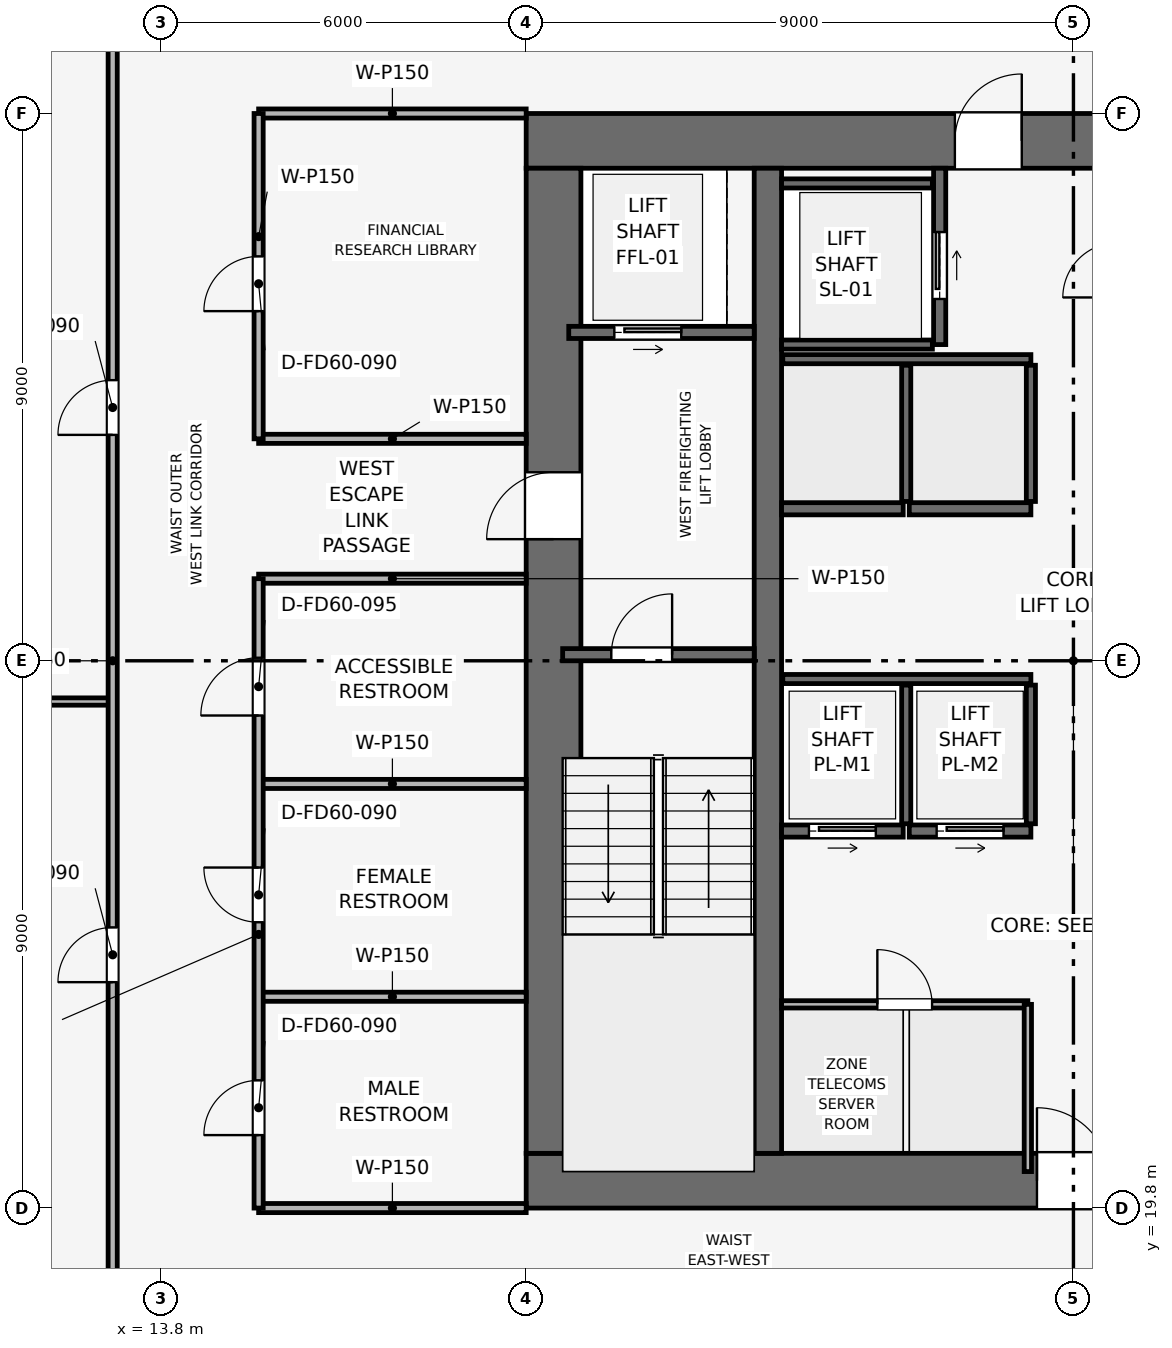
"""IFC4 building model, lengths in metres.
Left out: names, types, materials, properties, quantities, classifications, styles, units other than length and angle.
Written with IfcOpenShell. Run it as: python <this file> out.ifc"""

import sys

from ifc_helpers import new_model, si_unit, direction, frame, frame_2d, origin, place, context, subcontext, project, spatial, rectangle, extrude, element, fill, save


model = new_model("IFC4")
c1 = context("Model", 3, precision=1e-05, world=origin(), true_north=direction((0.0, 1.0)))
c2 = subcontext(c1, "Body", "Model", "MODEL_VIEW")
j1 = project(units=[si_unit("LENGTHUNIT", "METRE"), si_unit("PLANEANGLEUNIT", "RADIAN")], contexts=[c1])
p1 = place(None, origin())
s1 = spatial("IfcSite", under=j1, at=p1, CompositionType="ELEMENT")
p2 = place(p1, origin())
s2 = spatial("IfcBuilding", under=s1, at=p2, CompositionType="ELEMENT")
p3 = place(p2, frame((0.0, 0.0, 145.8)))
s3 = spatial("IfcBuildingStorey", under=s2, at=p3, CompositionType="ELEMENT", Elevation=145.8)
p4 = place(p3, frame((19.8, 20.25, 0.0), z_axis=(0.0, 0.0, 1.0), x_axis=(1.0, 0.0, 0.0)))
e1 = element("IfcWall", 1, at=p4, inside=s3, PredefinedType="SHEAR", context=c2, shape_type="SweptSolid", body=[
    extrude(rectangle(XDim=18.0, YDim=0.9, at=frame_2d((9.0, 0.0))), origin(), (0.0, 0.0, 1.0), 3.75),
])
p5 = place(p4, frame((8.4, 0.0, 0.0)))
e2 = element("IfcOpeningElement", 2, at=p5, cuts=e1, PredefinedType="OPENING", context=c2, shape_type="SweptSolid", body=[
    extrude(rectangle(XDim=1.2, YDim=2.2, at=frame_2d((0.6, 1.1))), frame((0.0, 0.46, 0.0), z_axis=(0.0, -1.0, 0.0), x_axis=(1.0, 0.0, 0.0)), (0.0, 0.0, 1.0), 0.92),
])
p6 = place(p3, frame((19.8, 37.35, 0.0), z_axis=(0.0, 0.0, 1.0), x_axis=(1.0, 0.0, 0.0)))
e3 = element("IfcWall", 3, at=p6, inside=s3, PredefinedType="SHEAR", context=c2, shape_type="SweptSolid", body=[
    extrude(rectangle(XDim=18.0, YDim=0.9, at=frame_2d((9.0, 0.0))), origin(), (0.0, 0.0, 1.0), 3.75),
])
p7 = place(p6, frame((7.05, 0.0, 0.0)))
e4 = element("IfcOpeningElement", 4, at=p7, cuts=e3, PredefinedType="OPENING", context=c2, shape_type="SweptSolid", body=[
    extrude(rectangle(XDim=1.1, YDim=2.15, at=frame_2d((0.55, 1.075))), frame((0.0, 0.46, 0.0), z_axis=(0.0, -1.0, 0.0), x_axis=(1.0, 0.0, 0.0)), (0.0, 0.0, 1.0), 0.92),
])
p8 = place(p3, frame((20.25, 20.7, 0.0), z_axis=(0.0, 0.0, 1.0), x_axis=(0.0, 1.0, 0.0)))
e5 = element("IfcWall", 5, at=p8, inside=s3, PredefinedType="SHEAR", context=c2, shape_type="SweptSolid", body=[
    extrude(rectangle(XDim=16.2, YDim=0.9, at=frame_2d((8.1, 0.0))), origin(), (0.0, 0.0, 1.0), 3.75),
])
p9 = place(p8, frame((10.1, 0.0, 0.0)))
e6 = element("IfcOpeningElement", 6, at=p9, cuts=e5, PredefinedType="OPENING", context=c2, shape_type="SweptSolid", body=[
    extrude(rectangle(XDim=1.1, YDim=2.15, at=frame_2d((0.55, 1.075))), frame((0.0, 0.46, 0.0), z_axis=(0.0, -1.0, 0.0), x_axis=(1.0, 0.0, 0.0)), (0.0, 0.0, 1.0), 0.92),
])
p10 = place(p3, frame((23.775, 20.7, 0.0), z_axis=(0.0, 0.0, 1.0), x_axis=(0.0, 1.0, 0.0)))
e7 = element("IfcWall", 7, at=p10, inside=s3, PredefinedType="SHEAR", context=c2, shape_type="SweptSolid", body=[
    extrude(rectangle(XDim=16.2, YDim=0.45, at=frame_2d((8.1, 0.0))), origin(), (0.0, 0.0, 1.0), 3.75),
])
p11 = place(p3, frame((20.4, 28.9, 0.0), z_axis=(0.0, 0.0, 1.0), x_axis=(1.0, 0.0, 0.0)))
e8 = element("IfcWall", 8, at=p11, inside=s3, PredefinedType="SHEAR", context=c2, shape_type="SweptSolid", body=[
    extrude(rectangle(XDim=3.15, YDim=0.2, at=frame_2d((1.575, 0.0))), origin(), (0.0, 0.0, 1.0), 3.495),
])
p12 = place(p11, frame((0.8, 0.0, 0.0)))
e9 = element("IfcOpeningElement", 9, at=p12, cuts=e8, PredefinedType="OPENING", context=c2, shape_type="SweptSolid", body=[
    extrude(rectangle(XDim=1.0, YDim=2.1, at=frame_2d((0.5, 1.05))), frame((0.0, 0.11, 0.0), z_axis=(0.0, -1.0, 0.0), x_axis=(1.0, 0.0, 0.0)), (0.0, 0.0, 1.0), 0.22),
])
p13 = place(p3, frame((20.5, 34.2, 0.0), z_axis=(0.0, 0.0, 1.0), x_axis=(1.0, 0.0, 0.0)))
e10 = element("IfcWall", 10, at=p13, inside=s3, PredefinedType="SHEAR", context=c2, shape_type="SweptSolid", body=[
    extrude(rectangle(XDim=3.05, YDim=0.2, at=frame_2d((1.525, 0.0))), origin(), (0.0, 0.0, 1.0), 3.495),
])
p14 = place(p13, frame((0.75, 0.0, 0.0)))
e11 = element("IfcOpeningElement", 11, at=p14, cuts=e10, PredefinedType="OPENING", context=c2, shape_type="SweptSolid", body=[
    extrude(rectangle(XDim=1.1, YDim=2.15, at=frame_2d((0.55, 1.075))), frame((0.0, 0.11, 0.0), z_axis=(0.0, -1.0, 0.0), x_axis=(1.0, 0.0, 0.0)), (0.0, 0.0, 1.0), 0.22),
])
p15 = place(p3, frame((26.6, 34.0, 0.0), z_axis=(0.0, 0.0, 1.0), x_axis=(0.0, 1.0, 0.0)))
e12 = element("IfcWall", 12, at=p15, inside=s3, PredefinedType="SHEAR", context=c2, shape_type="SweptSolid", body=[
    extrude(rectangle(XDim=2.9, YDim=0.2, at=frame_2d((1.45, 0.0))), origin(), (0.0, 0.0, 1.0), 3.495),
])
p16 = place(p15, frame((0.75, 0.0, 0.0)))
e13 = element("IfcOpeningElement", 13, at=p16, cuts=e12, PredefinedType="OPENING", context=c2, shape_type="SweptSolid", body=[
    extrude(rectangle(XDim=1.1, YDim=2.15, at=frame_2d((0.55, 1.075))), frame((0.0, 0.11, 0.0), z_axis=(0.0, -1.0, 0.0), x_axis=(1.0, 0.0, 0.0)), (0.0, 0.0, 1.0), 0.22),
])
for number, where, z_axis, x_axis in (
    (14, (24.0, 34.0, 0.0), (0.0, 0.0, 1.0), (1.0, 0.0, 0.0)),
    (15, (24.0, 36.65, 0.0), (0.0, 0.0, 1.0), (1.0, 0.0, 0.0)),
):
    element("IfcWall", number, at=place(p3, frame(where, z_axis=z_axis, x_axis=x_axis)), inside=s3, PredefinedType="SHEAR", context=c2, shape_type="SweptSolid", body=[
        extrude(rectangle(XDim=2.48, YDim=0.15, at=frame_2d((1.24, 0.0))), origin(), (0.0, 0.0, 1.0), 3.495),
    ])
p17 = place(p3, frame((24.0, 26.0, 0.0), z_axis=(0.0, 0.0, 1.0), x_axis=(1.0, 0.0, 0.0)))
e16 = element("IfcWall", 16, at=p17, inside=s3, PredefinedType="SHEAR", context=c2, shape_type="SweptSolid", body=[
    extrude(rectangle(XDim=2.0, YDim=0.2, at=frame_2d((1.0, 0.0))), origin(), (0.0, 0.0, 1.0), 3.495),
])
p18 = place(p17, frame((0.45, 0.0, 0.0)))
e17 = element("IfcOpeningElement", 17, at=p18, cuts=e16, PredefinedType="OPENING", context=c2, shape_type="SweptSolid", body=[
    extrude(rectangle(XDim=1.1, YDim=2.15, at=frame_2d((0.55, 1.075))), frame((0.0, 0.11, 0.0), z_axis=(0.0, -1.0, 0.0), x_axis=(1.0, 0.0, 0.0)), (0.0, 0.0, 1.0), 0.22),
])
p19 = place(p3, frame((26.1, 26.0, 0.0), z_axis=(0.0, 0.0, 1.0), x_axis=(1.0, 0.0, 0.0)))
e18 = element("IfcWall", 18, at=p19, inside=s3, PredefinedType="SHEAR", context=c2, shape_type="SweptSolid", body=[
    extrude(rectangle(XDim=2.0, YDim=0.2, at=frame_2d((1.0, 0.0))), origin(), (0.0, 0.0, 1.0), 3.495),
])
p20 = place(p19, frame((0.45, 0.0, 0.0)))
e19 = element("IfcOpeningElement", 19, at=p20, cuts=e18, PredefinedType="OPENING", context=c2, shape_type="SweptSolid", body=[
    extrude(rectangle(XDim=1.1, YDim=2.15, at=frame_2d((0.55, 1.075))), frame((0.0, 0.11, 0.0), z_axis=(0.0, -1.0, 0.0), x_axis=(1.0, 0.0, 0.0)), (0.0, 0.0, 1.0), 0.22),
])
for number, where, z_axis, x_axis in (
    (20, (24.0, 31.3, 0.0), (0.0, 0.0, 1.0), (1.0, 0.0, 0.0)),
    (21, (26.1, 31.3, 0.0), (0.0, 0.0, 1.0), (1.0, 0.0, 0.0)),
):
    element("IfcWall", number, at=place(p3, frame(where, z_axis=z_axis, x_axis=x_axis)), inside=s3, PredefinedType="SHEAR", context=c2, shape_type="SweptSolid", body=[
        extrude(rectangle(XDim=2.0, YDim=0.2, at=frame_2d((1.0, 0.0))), origin(), (0.0, 0.0, 1.0), 3.495),
    ])
p21 = place(p3, frame((24.02, 28.5, 0.0), z_axis=(0.0, 0.0, 1.0), x_axis=(1.0, 0.0, 0.0)))
e22 = element("IfcWall", 22, at=p21, inside=s3, PredefinedType="SHEAR", context=c2, shape_type="SweptSolid", body=[
    extrude(rectangle(XDim=4.08, YDim=0.15, at=frame_2d((2.04, 0.0))), origin(), (0.0, 0.0, 1.0), 3.495),
])
for number, where, z_axis, x_axis in (
    (23, (26.05, 26.12, 0.0), (0.0, 0.0, 1.0), (0.0, 1.0, 0.0)),
    (24, (28.1, 26.12, 0.0), (0.0, 0.0, 1.0), (0.0, 1.0, 0.0)),
):
    element("IfcWall", number, at=place(p3, frame(where, z_axis=z_axis, x_axis=x_axis)), inside=s3, PredefinedType="SHEAR", context=c2, shape_type="SweptSolid", body=[
        extrude(rectangle(XDim=2.28, YDim=0.15, at=frame_2d((1.14, 0.0))), origin(), (0.0, 0.0, 1.0), 3.495),
    ])
p22 = place(p3, frame((24.02, 33.76, 0.0), z_axis=(0.0, 0.0, 1.0), x_axis=(1.0, 0.0, 0.0)))
e25 = element("IfcWall", 25, at=p22, inside=s3, PredefinedType="SHEAR", context=c2, shape_type="SweptSolid", body=[
    extrude(rectangle(XDim=4.08, YDim=0.15, at=frame_2d((2.04, 0.0))), origin(), (0.0, 0.0, 1.0), 3.495),
])
for number, where, z_axis, x_axis in (
    (26, (26.05, 31.42, 0.0), (0.0, 0.0, 1.0), (0.0, 1.0, 0.0)),
    (27, (28.1, 31.42, 0.0), (0.0, 0.0, 1.0), (0.0, 1.0, 0.0)),
):
    element("IfcWall", number, at=place(p3, frame(where, z_axis=z_axis, x_axis=x_axis)), inside=s3, PredefinedType="SHEAR", context=c2, shape_type="SweptSolid", body=[
        extrude(rectangle(XDim=2.24, YDim=0.15, at=frame_2d((1.12, 0.0))), origin(), (0.0, 0.0, 1.0), 3.495),
    ])
p23 = place(p3, frame((24.0, 23.15, 0.0), z_axis=(0.0, 0.0, 1.0), x_axis=(1.0, 0.0, 0.0)))
e28 = element("IfcWall", 28, at=p23, inside=s3, PredefinedType="PARTITIONING", context=c2, shape_type="SweptSolid", body=[
    extrude(rectangle(XDim=4.05, YDim=0.12, at=frame_2d((2.025, 0.0))), origin(), (0.0, 0.0, 1.0), 3.495),
])
p24 = place(p23, frame((1.575, 0.0, 0.0)))
e29 = element("IfcOpeningElement", 29, at=p24, cuts=e28, PredefinedType="OPENING", context=c2, shape_type="SweptSolid", body=[
    extrude(rectangle(XDim=0.9, YDim=2.1, at=frame_2d((0.45, 1.05))), frame((0.0, 0.07, 0.0), z_axis=(0.0, -1.0, 0.0), x_axis=(1.0, 0.0, 0.0)), (0.0, 0.0, 1.0), 0.14),
])
p25 = place(p3, frame((28.05, 20.4, 0.0), z_axis=(0.0, 0.0, 1.0), x_axis=(0.0, 1.0, 0.0)))
e30 = element("IfcWall", 30, at=p25, inside=s3, PredefinedType="PARTITIONING", context=c2, shape_type="SweptSolid", body=[
    extrude(rectangle(XDim=2.75, YDim=0.12, at=frame_2d((1.375, 0.0))), origin(), (0.0, 0.0, 1.0), 3.495),
])
p26 = place(p3, frame((15.4, 19.8, 0.0), z_axis=(0.0, 0.0, 1.0), x_axis=(1.0, 0.0, 0.0)))
e31 = element("IfcWall", 31, at=p26, inside=s3, PredefinedType="PARTITIONING", context=c2, shape_type="SweptSolid", body=[
    extrude(rectangle(XDim=4.4, YDim=0.15, at=frame_2d((2.2, 0.0))), origin(), (0.0, 0.0, 1.0), 3.03),
])
for number, where, z_axis, x_axis in (
    (32, (15.4, 23.275, 0.0), (0.0, 0.0, 1.0), (1.0, 0.0, 0.0)),
    (33, (15.4, 26.775, 0.0), (0.0, 0.0, 1.0), (1.0, 0.0, 0.0)),
    (34, (15.4, 30.15, 0.0), (0.0, 0.0, 1.0), (1.0, 0.0, 0.0)),
    (35, (15.4, 32.45, 0.0), (0.0, 0.0, 1.0), (1.0, 0.0, 0.0)),
):
    element("IfcWall", number, at=place(p3, frame(where, z_axis=z_axis, x_axis=x_axis)), inside=s3, PredefinedType="PARTITIONING", context=c2, shape_type="SweptSolid", body=[
        extrude(rectangle(XDim=4.4, YDim=0.15, at=frame_2d((2.2, 0.0))), origin(), (0.0, 0.0, 1.0), 3.495),
    ])
p27 = place(p3, frame((15.4, 37.8, 0.0), z_axis=(0.0, 0.0, 1.0), x_axis=(1.0, 0.0, 0.0)))
e36 = element("IfcWall", 36, at=p27, inside=s3, PredefinedType="PARTITIONING", context=c2, shape_type="SweptSolid", body=[
    extrude(rectangle(XDim=4.4, YDim=0.15, at=frame_2d((2.2, 0.0))), origin(), (0.0, 0.0, 1.0), 3.03),
])
p28 = place(p3, frame((15.4, 19.8, 0.0), z_axis=(0.0, 0.0, 1.0), x_axis=(0.0, 1.0, 0.0)))
e37 = element("IfcWall", 37, at=p28, inside=s3, PredefinedType="PARTITIONING", context=c2, shape_type="SweptSolid", body=[
    extrude(rectangle(XDim=10.35, YDim=0.15, at=frame_2d((5.175, 0.0))), origin(), (0.0, 0.0, 1.0), 3.03),
])
p29 = place(p28, frame((1.2, 0.0, 0.0)))
e38 = element("IfcOpeningElement", 38, at=p29, cuts=e37, PredefinedType="OPENING", context=c2, shape_type="SweptSolid", body=[
    extrude(rectangle(XDim=0.9, YDim=2.1, at=frame_2d((0.45, 1.05))), frame((0.0, 0.085, 0.0), z_axis=(0.0, -1.0, 0.0), x_axis=(1.0, 0.0, 0.0)), (0.0, 0.0, 1.0), 0.17),
])
p30 = place(p28, frame((4.7, 0.0, 0.0)))
e39 = element("IfcOpeningElement", 39, at=p30, cuts=e37, PredefinedType="OPENING", context=c2, shape_type="SweptSolid", body=[
    extrude(rectangle(XDim=0.9, YDim=2.1, at=frame_2d((0.45, 1.05))), frame((0.0, 0.085, 0.0), z_axis=(0.0, -1.0, 0.0), x_axis=(1.0, 0.0, 0.0)), (0.0, 0.0, 1.0), 0.17),
])
p31 = place(p28, frame((8.1, 0.0, 0.0)))
e40 = element("IfcOpeningElement", 40, at=p31, cuts=e37, PredefinedType="OPENING", context=c2, shape_type="SweptSolid", body=[
    extrude(rectangle(XDim=0.95, YDim=2.1, at=frame_2d((0.475, 1.05))), frame((0.0, 0.085, 0.0), z_axis=(0.0, -1.0, 0.0), x_axis=(1.0, 0.0, 0.0)), (0.0, 0.0, 1.0), 0.17),
])
p32 = place(p3, frame((15.4, 32.45, 0.0), z_axis=(0.0, 0.0, 1.0), x_axis=(0.0, 1.0, 0.0)))
e41 = element("IfcWall", 41, at=p32, inside=s3, PredefinedType="PARTITIONING", context=c2, shape_type="SweptSolid", body=[
    extrude(rectangle(XDim=5.35, YDim=0.15, at=frame_2d((2.675, 0.0))), origin(), (0.0, 0.0, 1.0), 3.03),
])
p33 = place(p32, frame((2.1, 0.0, 0.0)))
e42 = element("IfcOpeningElement", 42, at=p33, cuts=e41, PredefinedType="OPENING", context=c2, shape_type="SweptSolid", body=[
    extrude(rectangle(XDim=0.9, YDim=2.1, at=frame_2d((0.45, 1.05))), frame((0.0, 0.085, 0.0), z_axis=(0.0, -1.0, 0.0), x_axis=(1.0, 0.0, 0.0)), (0.0, 0.0, 1.0), 0.17),
])
p34 = place(p3, frame((4.63, 28.13, 0.0), z_axis=(0.0, 0.0, 1.0), x_axis=(1.0, 0.0, 0.0)))
e43 = element("IfcWall", 43, at=p34, inside=s3, PredefinedType="PARTITIONING", context=c2, shape_type="SweptSolid", body=[
    extrude(rectangle(XDim=8.37, YDim=0.12, at=frame_2d((4.185, 0.0))), origin(), (0.0, 0.0, 1.0), 2.98),
])
p35 = place(p3, frame((13.0, 17.4, 0.0), z_axis=(0.0, 0.0, 1.0), x_axis=(0.0, 1.0, 0.0)))
e44 = element("IfcWall", 44, at=p35, inside=s3, PredefinedType="PARTITIONING", context=c2, shape_type="SweptSolid", body=[
    extrude(rectangle(XDim=22.8, YDim=0.15, at=frame_2d((11.4, 0.0))), origin(), (0.0, 0.0, 1.0), 3.03),
])
p36 = place(p35, frame((6.115, 0.0, 0.0)))
e45 = element("IfcOpeningElement", 45, at=p36, cuts=e44, PredefinedType="OPENING", context=c2, shape_type="SweptSolid", body=[
    extrude(rectangle(XDim=0.9, YDim=2.1, at=frame_2d((0.45, 1.05))), frame((0.0, 0.085, 0.0), z_axis=(0.0, -1.0, 0.0), x_axis=(1.0, 0.0, 0.0)), (0.0, 0.0, 1.0), 0.17),
])
p37 = place(p35, frame((15.115, 0.0, 0.0)))
e46 = element("IfcOpeningElement", 46, at=p37, cuts=e44, PredefinedType="OPENING", context=c2, shape_type="SweptSolid", body=[
    extrude(rectangle(XDim=0.9, YDim=2.1, at=frame_2d((0.45, 1.05))), frame((0.0, 0.085, 0.0), z_axis=(0.0, -1.0, 0.0), x_axis=(1.0, 0.0, 0.0)), (0.0, 0.0, 1.0), 0.17),
])
p38 = place(p12, origin())
e47 = element("IfcDoor", 47, at=p38, inside=s3, OperationType="SINGLE_SWING_RIGHT", PredefinedType="DOOR", context=c2, shape_type="SweptSolid", body=[
    extrude(rectangle(XDim=1.0, YDim=2.1, at=frame_2d((0.5, 1.05))), frame((0.0, 0.025, 0.0), z_axis=(0.0, -1.0, 0.0), x_axis=(1.0, 0.0, 0.0)), (0.0, 0.0, 1.0), 0.05),
])
fill(e9, e47)
p39 = place(p14, origin())
e48 = element("IfcDoor", 48, at=p39, inside=s3, OperationType="SLIDING_TO_RIGHT", PredefinedType="DOOR", context=c2, shape_type="SweptSolid", body=[
    extrude(rectangle(XDim=1.1, YDim=2.15, at=frame_2d((0.55, 1.075))), frame((0.0, 0.025, 0.0), z_axis=(0.0, -1.0, 0.0), x_axis=(1.0, 0.0, 0.0)), (0.0, 0.0, 1.0), 0.05),
])
fill(e11, e48)
p40 = place(p16, origin())
e49 = element("IfcDoor", 49, at=p40, inside=s3, OperationType="SLIDING_TO_RIGHT", PredefinedType="DOOR", context=c2, shape_type="SweptSolid", body=[
    extrude(rectangle(XDim=1.1, YDim=2.15, at=frame_2d((0.55, 1.075))), frame((0.0, 0.025, 0.0), z_axis=(0.0, -1.0, 0.0), x_axis=(1.0, 0.0, 0.0)), (0.0, 0.0, 1.0), 0.05),
])
fill(e13, e49)
p41 = place(p18, origin())
e50 = element("IfcDoor", 50, at=p41, inside=s3, OperationType="SLIDING_TO_RIGHT", PredefinedType="DOOR", context=c2, shape_type="SweptSolid", body=[
    extrude(rectangle(XDim=1.1, YDim=2.15, at=frame_2d((0.55, 1.075))), frame((0.0, 0.025, 0.0), z_axis=(0.0, -1.0, 0.0), x_axis=(1.0, 0.0, 0.0)), (0.0, 0.0, 1.0), 0.05),
])
fill(e17, e50)
p42 = place(p20, origin())
e51 = element("IfcDoor", 51, at=p42, inside=s3, OperationType="SLIDING_TO_RIGHT", PredefinedType="DOOR", context=c2, shape_type="SweptSolid", body=[
    extrude(rectangle(XDim=1.1, YDim=2.15, at=frame_2d((0.55, 1.075))), frame((0.0, 0.025, 0.0), z_axis=(0.0, -1.0, 0.0), x_axis=(1.0, 0.0, 0.0)), (0.0, 0.0, 1.0), 0.05),
])
fill(e19, e51)
p43 = place(p24, origin())
e52 = element("IfcDoor", 52, at=p43, inside=s3, OperationType="SINGLE_SWING_LEFT", PredefinedType="DOOR", context=c2, shape_type="SweptSolid", body=[
    extrude(rectangle(XDim=0.9, YDim=2.1, at=frame_2d((0.45, 1.05))), frame((0.0, 0.025, 0.0), z_axis=(0.0, -1.0, 0.0), x_axis=(1.0, 0.0, 0.0)), (0.0, 0.0, 1.0), 0.05),
])
fill(e29, e52)
p44 = place(p29, origin())
e53 = element("IfcDoor", 53, at=p44, inside=s3, OperationType="SINGLE_SWING_LEFT", PredefinedType="DOOR", context=c2, shape_type="SweptSolid", body=[
    extrude(rectangle(XDim=0.9, YDim=2.1, at=frame_2d((0.45, 1.05))), frame((0.0, 0.025, 0.0), z_axis=(0.0, -1.0, 0.0), x_axis=(1.0, 0.0, 0.0)), (0.0, 0.0, 1.0), 0.05),
])
fill(e38, e53)
p45 = place(p30, origin())
e54 = element("IfcDoor", 54, at=p45, inside=s3, OperationType="SINGLE_SWING_RIGHT", PredefinedType="DOOR", context=c2, shape_type="SweptSolid", body=[
    extrude(rectangle(XDim=0.9, YDim=2.1, at=frame_2d((0.45, 1.05))), frame((0.0, 0.025, 0.0), z_axis=(0.0, -1.0, 0.0), x_axis=(1.0, 0.0, 0.0)), (0.0, 0.0, 1.0), 0.05),
])
fill(e39, e54)
p46 = place(p31, origin())
e55 = element("IfcDoor", 55, at=p46, inside=s3, OperationType="SINGLE_SWING_LEFT", PredefinedType="DOOR", context=c2, shape_type="SweptSolid", body=[
    extrude(rectangle(XDim=0.95, YDim=2.1, at=frame_2d((0.475, 1.05))), frame((0.0, 0.025, 0.0), z_axis=(0.0, -1.0, 0.0), x_axis=(1.0, 0.0, 0.0)), (0.0, 0.0, 1.0), 0.05),
])
fill(e40, e55)
p47 = place(p33, origin())
e56 = element("IfcDoor", 56, at=p47, inside=s3, OperationType="SINGLE_SWING_LEFT", PredefinedType="DOOR", context=c2, shape_type="SweptSolid", body=[
    extrude(rectangle(XDim=0.9, YDim=2.1, at=frame_2d((0.45, 1.05))), frame((0.0, 0.025, 0.0), z_axis=(0.0, -1.0, 0.0), x_axis=(1.0, 0.0, 0.0)), (0.0, 0.0, 1.0), 0.05),
])
fill(e42, e56)
p48 = place(p36, origin())
e57 = element("IfcDoor", 57, at=p48, inside=s3, OperationType="SINGLE_SWING_LEFT", PredefinedType="DOOR", context=c2, shape_type="SweptSolid", body=[
    extrude(rectangle(XDim=0.9, YDim=2.1, at=frame_2d((0.45, 1.05))), frame((0.0, 0.025, 0.0), z_axis=(0.0, -1.0, 0.0), x_axis=(1.0, 0.0, 0.0)), (0.0, 0.0, 1.0), 0.05),
])
fill(e45, e57)
p49 = place(p37, origin())
e58 = element("IfcDoor", 58, at=p49, inside=s3, OperationType="SINGLE_SWING_LEFT", PredefinedType="DOOR", context=c2, shape_type="SweptSolid", body=[
    extrude(rectangle(XDim=0.9, YDim=2.1, at=frame_2d((0.45, 1.05))), frame((0.0, 0.025, 0.0), z_axis=(0.0, -1.0, 0.0), x_axis=(1.0, 0.0, 0.0)), (0.0, 0.0, 1.0), 0.05),
])
fill(e46, e58)
p50 = place(p9, origin())
e59 = element("IfcDoor", 59, at=p50, inside=s3, OperationType="SINGLE_SWING_LEFT", PredefinedType="DOOR", context=c2, shape_type="SweptSolid", body=[
    extrude(rectangle(XDim=1.1, YDim=2.15, at=frame_2d((0.55, 1.075))), frame((0.0, 0.025, 0.0), z_axis=(0.0, -1.0, 0.0), x_axis=(1.0, 0.0, 0.0)), (0.0, 0.0, 1.0), 0.05),
])
fill(e6, e59)
p51 = place(p5, origin())
e60 = element("IfcDoor", 60, at=p51, inside=s3, OperationType="SINGLE_SWING_LEFT", PredefinedType="DOOR", context=c2, shape_type="SweptSolid", body=[
    extrude(rectangle(XDim=1.2, YDim=2.2, at=frame_2d((0.6, 1.1))), frame((0.0, 0.025, 0.0), z_axis=(0.0, -1.0, 0.0), x_axis=(1.0, 0.0, 0.0)), (0.0, 0.0, 1.0), 0.05),
])
fill(e2, e60)
p52 = place(p7, origin())
e61 = element("IfcDoor", 61, at=p52, inside=s3, OperationType="SINGLE_SWING_RIGHT", PredefinedType="DOOR", context=c2, shape_type="SweptSolid", body=[
    extrude(rectangle(XDim=1.1, YDim=2.15, at=frame_2d((0.55, 1.075))), frame((0.0, 0.025, 0.0), z_axis=(0.0, -1.0, 0.0), x_axis=(1.0, 0.0, 0.0)), (0.0, 0.0, 1.0), 0.05),
])
fill(e4, e61)
save(model, sys.argv[1])
